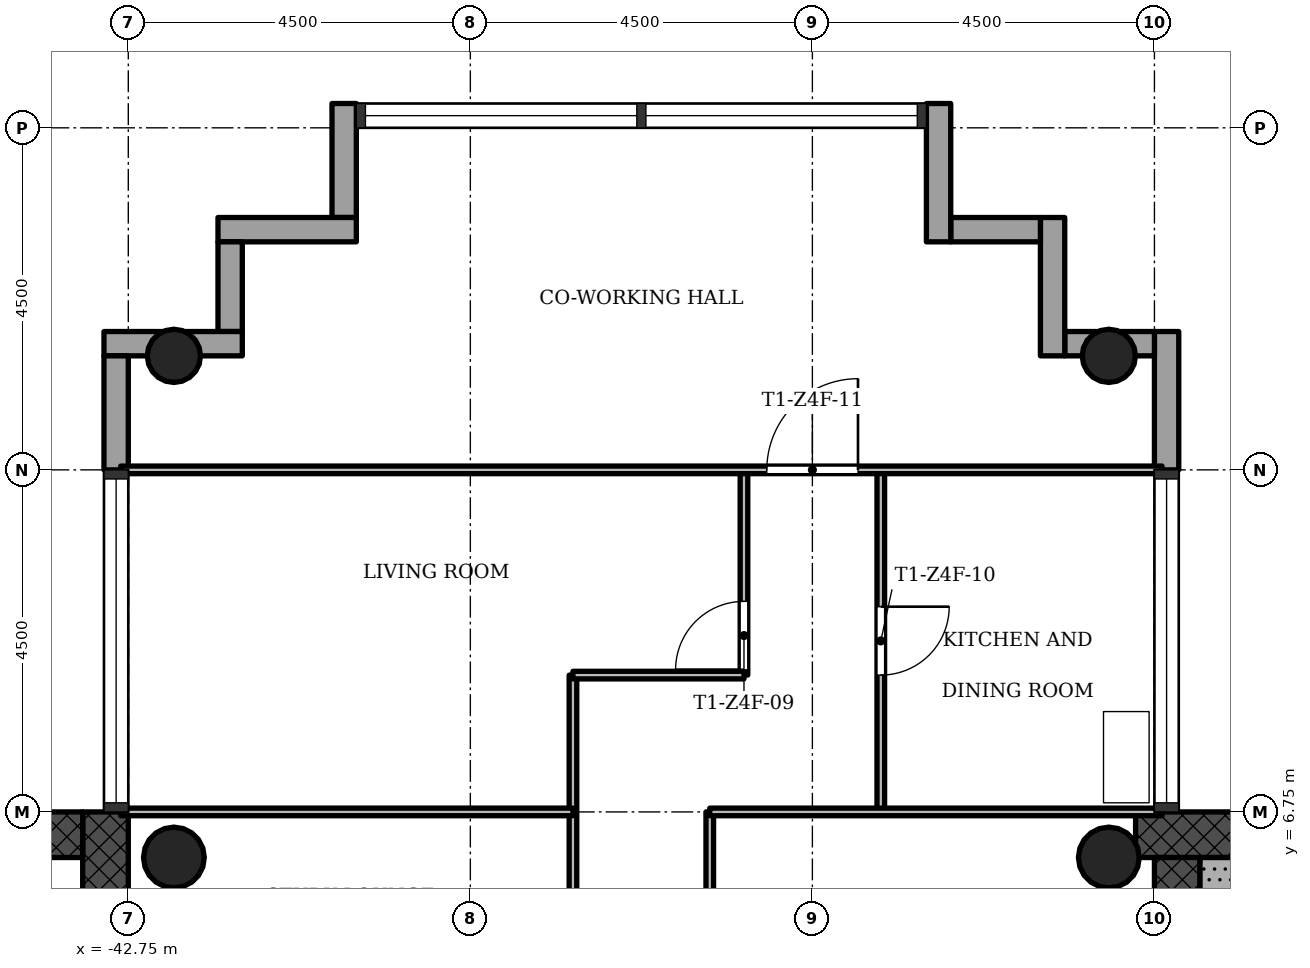
"""IFC4 building model, lengths in metres.
Left out: names, types, materials, properties, quantities, classifications, styles, units other than length and angle.
Written with IfcOpenShell. Run it as: python <this file> out.ifc"""

import sys

from ifc_helpers import new_model, si_unit, direction, frame, frame_2d, origin, origin_2d, place, context, subcontext, project, spatial, rectangle, hollow_circle, extrude, element, fill, save


model = new_model("IFC4")
c1 = context("Model", 3, precision=1e-05, world=origin(), true_north=direction((0.0, 1.0)))
c2 = subcontext(c1, "Body", "Model", "MODEL_VIEW")
j1 = project(units=[si_unit("LENGTHUNIT", "METRE"), si_unit("PLANEANGLEUNIT", "RADIAN")], contexts=[c1])
p1 = place(None, origin())
s1 = spatial("IfcSite", under=j1, at=p1, CompositionType="ELEMENT")
p2 = place(p1, origin())
s2 = spatial("IfcBuilding", under=s1, at=p2, CompositionType="ELEMENT")
p3 = place(p2, frame((0.0, 0.0, 223.2)))
s3 = spatial("IfcBuildingStorey", under=s2, at=p3, CompositionType="ELEMENT", Elevation=223.2)
p4 = place(p3, frame((-20.602, 6.45, 0.0), z_axis=(0.0, 0.0, 1.0), x_axis=(-1.0, 0.0, 0.0)))
e1 = element("IfcWall", 1, at=p4, inside=s3, PredefinedType="SHEAR", context=c2, shape_type="SweptSolid", body=[
    extrude(rectangle(XDim=8.896, YDim=0.6, at=frame_2d((4.448, 0.0))), origin(), (0.0, 0.0, 1.0), 3.4),
])
p5 = place(p3, frame((-28.95, 6.15, 0.0), z_axis=(0.0, 0.0, 1.0), x_axis=(0.0, -1.0, 0.0)))
e2 = element("IfcWall", 2, at=p5, inside=s3, PredefinedType="SHEAR", context=c2, shape_type="SweptSolid", body=[
    extrude(rectangle(XDim=12.9, YDim=0.6, at=frame_2d((6.45, 0.0))), origin(), (0.0, 0.0, 1.0), 3.4),
])
p6 = place(p5, frame((5.25, 0.0, 0.0)))
e3 = element("IfcOpeningElement", 3, at=p6, cuts=e2, PredefinedType="OPENING", context=c2, shape_type="SweptSolid", body=[
    extrude(rectangle(XDim=1.8, YDim=2.1, at=frame_2d((0.9, 1.05))), frame((0.0, 0.31, 0.0), z_axis=(0.0, -1.0, 0.0), x_axis=(1.0, 0.0, 0.0)), (0.0, 0.0, 1.0), 0.62),
])
p7 = place(p3, frame((-43.05, -6.15, 0.0), z_axis=(0.0, 0.0, 1.0), x_axis=(0.0, 1.0, 0.0)))
e4 = element("IfcWall", 4, at=p7, inside=s3, PredefinedType="SHEAR", context=c2, shape_type="SweptSolid", body=[
    extrude(rectangle(XDim=12.9, YDim=0.6, at=frame_2d((6.45, 0.0))), origin(), (0.0, 0.0, 1.0), 3.4),
])
p8 = place(p7, frame((5.25, 0.0, 0.0)))
e5 = element("IfcOpeningElement", 5, at=p8, cuts=e4, PredefinedType="OPENING", context=c2, shape_type="SweptSolid", body=[
    extrude(rectangle(XDim=1.8, YDim=2.1, at=frame_2d((0.9, 1.05))), frame((0.0, 0.31, 0.0), z_axis=(0.0, -1.0, 0.0), x_axis=(1.0, 0.0, 0.0)), (0.0, 0.0, 1.0), 0.62),
])
p9 = place(p3, frame((-43.35, 6.45, 0.0), z_axis=(0.0, 0.0, 1.0), x_axis=(-1.0, 0.0, 0.0)))
e6 = element("IfcWall", 6, at=p9, inside=s3, PredefinedType="SHEAR", context=c2, shape_type="SweptSolid", body=[
    extrude(rectangle(XDim=8.4, YDim=0.6, at=frame_2d((4.2, 0.0))), origin(), (0.0, 0.0, 1.0), 3.4),
])
for number, where, z_axis, x_axis in (
    (7, (-29.85, 12.75, 0.0), (0.0, 0.0, 1.0), (1.0, 0.0, 0.0)),
    (8, (-42.15, 12.75, 0.0), (0.0, 0.0, 1.0), (1.0, 0.0, 0.0)),
):
    element("IfcColumn", number, at=place(p3, frame(where, z_axis=z_axis, x_axis=x_axis)), inside=s3, PredefinedType="COLUMN", context=c2, shape_type="SweptSolid", body=[
        extrude(hollow_circle(Radius=0.35, WallThickness=0.025, at=origin_2d()), origin(), (0.0, 0.0, 1.0), 3.4),
    ])
for number, where, z_axis, x_axis in (
    (9, (-29.85, 6.15, 0.0), (0.0, 0.0, 1.0), (1.0, 0.0, 0.0)),
    (10, (-42.15, 6.15, 0.0), (0.0, 0.0, 1.0), (1.0, 0.0, 0.0)),
):
    element("IfcColumn", number, at=place(p3, frame(where, z_axis=z_axis, x_axis=x_axis)), inside=s3, PredefinedType="COLUMN", context=c2, shape_type="SweptSolid", body=[
        extrude(hollow_circle(Radius=0.4, WallThickness=0.028, at=origin_2d()), origin(), (0.0, 0.0, 1.0), 3.4),
    ])
p10 = place(p3, frame((-29.09, 11.25, -0.3), z_axis=(0.0, 0.0, 1.0), x_axis=(0.0, 1.0, 0.0)))
e11 = element("IfcWall", 11, at=p10, inside=s3, PredefinedType="STANDARD", context=c2, shape_type="SweptSolid", body=[
    extrude(rectangle(XDim=1.82, YDim=0.32, at=frame_2d((0.91, 0.0))), origin(), (0.0, 0.0, 1.0), 3.4),
])
p11 = place(p3, frame((-29.25, 12.91, -0.3), z_axis=(0.0, 0.0, 1.0), x_axis=(-1.0, 0.0, 0.0)))
e12 = element("IfcWall", 12, at=p11, inside=s3, PredefinedType="STANDARD", context=c2, shape_type="SweptSolid", body=[
    extrude(rectangle(XDim=1.18, YDim=0.32, at=frame_2d((0.59, 0.0))), origin(), (0.0, 0.0, 1.0), 3.4),
])
p12 = place(p3, frame((-30.59, 12.75, -0.3), z_axis=(0.0, 0.0, 1.0), x_axis=(0.0, 1.0, 0.0)))
e13 = element("IfcWall", 13, at=p12, inside=s3, PredefinedType="STANDARD", context=c2, shape_type="SweptSolid", body=[
    extrude(rectangle(XDim=1.82, YDim=0.32, at=frame_2d((0.91, 0.0))), origin(), (0.0, 0.0, 1.0), 3.4),
])
p13 = place(p3, frame((-30.75, 14.41, -0.3), z_axis=(0.0, 0.0, 1.0), x_axis=(-1.0, 0.0, 0.0)))
e14 = element("IfcWall", 14, at=p13, inside=s3, PredefinedType="STANDARD", context=c2, shape_type="SweptSolid", body=[
    extrude(rectangle(XDim=1.18, YDim=0.32, at=frame_2d((0.59, 0.0))), origin(), (0.0, 0.0, 1.0), 3.4),
])
p14 = place(p3, frame((-32.09, 14.25, -0.3), z_axis=(0.0, 0.0, 1.0), x_axis=(0.0, 1.0, 0.0)))
e15 = element("IfcWall", 15, at=p14, inside=s3, PredefinedType="STANDARD", context=c2, shape_type="SweptSolid", body=[
    extrude(rectangle(XDim=1.82, YDim=0.32, at=frame_2d((0.91, 0.0))), origin(), (0.0, 0.0, 1.0), 3.4),
])
p15 = place(p3, frame((-39.91, 16.07, -0.3), z_axis=(0.0, 0.0, 1.0), x_axis=(0.0, -1.0, 0.0)))
e16 = element("IfcWall", 16, at=p15, inside=s3, PredefinedType="STANDARD", context=c2, shape_type="SweptSolid", body=[
    extrude(rectangle(XDim=1.5, YDim=0.32, at=frame_2d((0.75, 0.0))), origin(), (0.0, 0.0, 1.0), 3.4),
])
p16 = place(p3, frame((-39.75, 14.41, -0.3), z_axis=(0.0, 0.0, 1.0), x_axis=(-1.0, 0.0, 0.0)))
e17 = element("IfcWall", 17, at=p16, inside=s3, PredefinedType="STANDARD", context=c2, shape_type="SweptSolid", body=[
    extrude(rectangle(XDim=1.82, YDim=0.32, at=frame_2d((0.91, 0.0))), origin(), (0.0, 0.0, 1.0), 3.4),
])
p17 = place(p3, frame((-41.41, 14.25, -0.3), z_axis=(0.0, 0.0, 1.0), x_axis=(0.0, -1.0, 0.0)))
e18 = element("IfcWall", 18, at=p17, inside=s3, PredefinedType="STANDARD", context=c2, shape_type="SweptSolid", body=[
    extrude(rectangle(XDim=1.18, YDim=0.32, at=frame_2d((0.59, 0.0))), origin(), (0.0, 0.0, 1.0), 3.4),
])
p18 = place(p3, frame((-41.25, 12.91, -0.3), z_axis=(0.0, 0.0, 1.0), x_axis=(-1.0, 0.0, 0.0)))
e19 = element("IfcWall", 19, at=p18, inside=s3, PredefinedType="STANDARD", context=c2, shape_type="SweptSolid", body=[
    extrude(rectangle(XDim=1.82, YDim=0.32, at=frame_2d((0.91, 0.0))), origin(), (0.0, 0.0, 1.0), 3.4),
])
p19 = place(p3, frame((-42.91, 12.75, -0.3), z_axis=(0.0, 0.0, 1.0), x_axis=(0.0, -1.0, 0.0)))
e20 = element("IfcWall", 20, at=p19, inside=s3, PredefinedType="STANDARD", context=c2, shape_type="SweptSolid", body=[
    extrude(rectangle(XDim=1.5, YDim=0.32, at=frame_2d((0.75, 0.0))), origin(), (0.0, 0.0, 1.0), 3.4),
])
p20 = place(p3, frame((-36.9, 4.5, 0.0), z_axis=(0.0, 0.0, 1.0), x_axis=(0.0, 1.0, 0.0)))
e21 = element("IfcWall", 21, at=p20, inside=s3, PredefinedType="PARTITIONING", context=c2, shape_type="SweptSolid", body=[
    extrude(rectangle(XDim=4.05, YDim=0.1, at=frame_2d((2.025, 0.0))), origin(), (0.0, 0.0, 1.0), 3.0),
])
p21 = place(p3, frame((-35.1, 4.5, 0.0), z_axis=(0.0, 0.0, 1.0), x_axis=(0.0, 1.0, 0.0)))
e22 = element("IfcWall", 22, at=p21, inside=s3, PredefinedType="PARTITIONING", context=c2, shape_type="SweptSolid", body=[
    extrude(rectangle(XDim=2.25, YDim=0.1, at=frame_2d((1.125, 0.0))), origin(), (0.0, 0.0, 1.0), 3.0),
])
p22 = place(p3, frame((-34.65, 8.55, 0.0), z_axis=(0.0, 0.0, 1.0), x_axis=(0.0, 1.0, 0.0)))
e23 = element("IfcWall", 23, at=p22, inside=s3, PredefinedType="PARTITIONING", context=c2, shape_type="SweptSolid", body=[
    extrude(rectangle(XDim=2.7, YDim=0.1, at=frame_2d((1.35, 0.0))), origin(), (0.0, 0.0, 1.0), 3.0),
])
p23 = place(p22, frame((0.07, 0.0, 0.0)))
e24 = element("IfcOpeningElement", 24, at=p23, cuts=e23, PredefinedType="OPENING", context=c2, shape_type="SweptSolid", body=[
    extrude(rectangle(XDim=0.9, YDim=2.1, at=frame_2d((0.45, 1.05))), frame((0.0, 0.06, 0.0), z_axis=(0.0, -1.0, 0.0), x_axis=(1.0, 0.0, 0.0)), (0.0, 0.0, 1.0), 0.12),
])
p24 = place(p3, frame((-32.85, 6.75, 0.0), z_axis=(0.0, 0.0, 1.0), x_axis=(0.0, 1.0, 0.0)))
e25 = element("IfcWall", 25, at=p24, inside=s3, PredefinedType="PARTITIONING", context=c2, shape_type="SweptSolid", body=[
    extrude(rectangle(XDim=4.5, YDim=0.1, at=frame_2d((2.25, 0.0))), origin(), (0.0, 0.0, 1.0), 3.0),
])
p25 = place(p24, frame((1.8, 0.0, 0.0)))
e26 = element("IfcOpeningElement", 26, at=p25, cuts=e25, PredefinedType="OPENING", context=c2, shape_type="SweptSolid", body=[
    extrude(rectangle(XDim=0.9, YDim=2.1, at=frame_2d((0.45, 1.05))), frame((0.0, 0.06, 0.0), z_axis=(0.0, -1.0, 0.0), x_axis=(1.0, 0.0, 0.0)), (0.0, 0.0, 1.0), 0.12),
])
for number, where, z_axis, x_axis in (
    (27, (-42.85, 6.75, 0.0), (0.0, 0.0, 1.0), (1.0, 0.0, 0.0)),
    (28, (-35.1, 6.75, 0.0), (0.0, 0.0, 1.0), (1.0, 0.0, 0.0)),
):
    element("IfcWall", number, at=place(p3, frame(where, z_axis=z_axis, x_axis=x_axis)), inside=s3, PredefinedType="PARTITIONING", context=c2, shape_type="SweptSolid", body=[
        extrude(rectangle(XDim=5.95, YDim=0.1, at=frame_2d((2.975, 0.0))), origin(), (0.0, 0.0, 1.0), 3.0),
    ])
p26 = place(p3, frame((-36.9, 8.55, 0.0), z_axis=(0.0, 0.0, 1.0), x_axis=(1.0, 0.0, 0.0)))
e29 = element("IfcWall", 29, at=p26, inside=s3, PredefinedType="PARTITIONING", context=c2, shape_type="SweptSolid", body=[
    extrude(rectangle(XDim=2.25, YDim=0.1, at=frame_2d((1.125, 0.0))), origin(), (0.0, 0.0, 1.0), 3.0),
])
p27 = place(p3, frame((-42.85, 11.25, 0.0), z_axis=(0.0, 0.0, 1.0), x_axis=(1.0, 0.0, 0.0)))
e30 = element("IfcWall", 30, at=p27, inside=s3, PredefinedType="PARTITIONING", context=c2, shape_type="SweptSolid", body=[
    extrude(rectangle(XDim=13.7, YDim=0.1, at=frame_2d((6.85, 0.0))), origin(), (0.0, 0.0, 1.0), 3.0),
])
p28 = place(p27, frame((8.5, 0.0, 0.0)))
e31 = element("IfcOpeningElement", 31, at=p28, cuts=e30, PredefinedType="OPENING", context=c2, shape_type="SweptSolid", body=[
    extrude(rectangle(XDim=1.2, YDim=2.1, at=frame_2d((0.6, 1.05))), frame((0.0, 0.06, 0.0), z_axis=(0.0, -1.0, 0.0), x_axis=(1.0, 0.0, 0.0)), (0.0, 0.0, 1.0), 0.12),
])
p29 = place(p3, frame((-28.35, 1.85, 0.0), z_axis=(0.0, 0.0, 1.0), x_axis=(0.0, 1.0, 0.0)))
e32 = element("IfcWall", 32, at=p29, inside=s3, PredefinedType="SHEAR", context=c2, shape_type="SweptSolid", body=[
    extrude(rectangle(XDim=4.3, YDim=0.6, at=frame_2d((2.15, 0.0))), origin(), (0.0, 0.0, 1.0), 3.4),
])
p30 = place(p23, origin())
e33 = element("IfcDoor", 33, at=p30, inside=s3, OperationType="SINGLE_SWING_RIGHT", PredefinedType="DOOR", context=c2, shape_type="SweptSolid", body=[
    extrude(rectangle(XDim=0.9, YDim=2.1, at=frame_2d((0.45, 1.05))), frame((0.0, 0.025, 0.0), z_axis=(0.0, -1.0, 0.0), x_axis=(1.0, 0.0, 0.0)), (0.0, 0.0, 1.0), 0.05),
])
fill(e24, e33)
p31 = place(p25, origin())
e34 = element("IfcDoor", 34, at=p31, inside=s3, OperationType="SINGLE_SWING_RIGHT", PredefinedType="DOOR", context=c2, shape_type="SweptSolid", body=[
    extrude(rectangle(XDim=0.9, YDim=2.1, at=frame_2d((0.45, 1.05))), frame((0.0, 0.025, 0.0), z_axis=(0.0, -1.0, 0.0), x_axis=(1.0, 0.0, 0.0)), (0.0, 0.0, 1.0), 0.05),
])
fill(e26, e34)
p32 = place(p28, origin())
e35 = element("IfcDoor", 35, at=p32, inside=s3, OperationType="SINGLE_SWING_LEFT", PredefinedType="DOOR", context=c2, shape_type="SweptSolid", body=[
    extrude(rectangle(XDim=1.2, YDim=2.1, at=frame_2d((0.6, 1.05))), frame((0.0, 0.025, 0.0), z_axis=(0.0, -1.0, 0.0), x_axis=(1.0, 0.0, 0.0)), (0.0, 0.0, 1.0), 0.05),
])
fill(e31, e35)
save(model, sys.argv[1])
